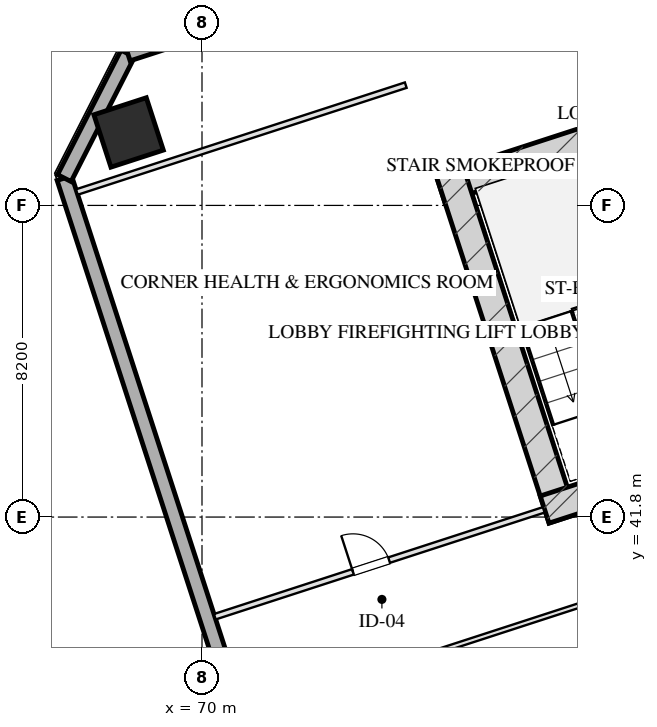
"""IFC4 building model, lengths in metres.
Left out: names, types, materials, properties, quantities, classifications, styles, units other than length and angle.
Written with IfcOpenShell. Run it as: python <this file> out.ifc"""

import sys

from ifc_helpers import new_model, si_unit, direction, frame, frame_2d, origin, origin_2d, place, context, subcontext, project, spatial, rectangle, hollow_rectangle, extrude, element, fill, save


model = new_model("IFC4")
c1 = context("Model", 3, precision=1e-05, world=origin(), true_north=direction((0.0, 1.0)))
c2 = subcontext(c1, "Body", "Model", "MODEL_VIEW")
j1 = project(units=[si_unit("LENGTHUNIT", "METRE"), si_unit("PLANEANGLEUNIT", "RADIAN")], contexts=[c1])
p1 = place(None, origin())
s1 = spatial("IfcSite", under=j1, at=p1, CompositionType="ELEMENT")
p2 = place(p1, origin())
s2 = spatial("IfcBuilding", under=s1, at=p2, CompositionType="ELEMENT")
p3 = place(p2, frame((0.0, 0.0, 85.1)))
s3 = spatial("IfcBuildingStorey", under=s2, at=p3, CompositionType="ELEMENT", Elevation=85.1)
p4 = place(p3, frame((76.272, 50.443, 0.0), z_axis=(0.0, 0.0, 1.0), x_axis=(0.951056072937, 0.309018358888, 0.0)))
e1 = element("IfcWall", 1, at=p4, inside=s3, PredefinedType="SHEAR", context=c2, shape_type="SweptSolid", body=[
    extrude(rectangle(XDim=16.55, YDim=0.75, at=frame_2d((8.275, 0.0))), origin(), (0.0, 0.0, 1.0), 3.45),
])
p5 = place(p3, frame((79.489, 41.756, 0.0), z_axis=(0.0, 0.0, 1.0), x_axis=(-0.309016134813, 0.951056795583, 0.0)))
e2 = element("IfcWall", 2, at=p5, inside=s3, PredefinedType="SHEAR", context=c2, shape_type="SweptSolid", body=[
    extrude(rectangle(XDim=9.63, YDim=0.75, at=frame_2d((4.815, 0.0))), origin(), (0.0, 0.0, 1.0), 3.45),
])
p6 = place(p3, frame((79.016, 41.997, 0.0), z_axis=(0.0, 0.0, 1.0), x_axis=(0.95106038264, 0.309005094736, 0.0)))
e3 = element("IfcWall", 3, at=p6, inside=s3, PredefinedType="SHEAR", context=c2, shape_type="SweptSolid", body=[
    extrude(rectangle(XDim=4.295, YDim=0.75, at=frame_2d((2.147, 0.0))), origin(), (0.0, 0.0, 1.0), 3.45),
])
p7 = place(p3, frame((68.069, 51.92, 0.0), z_axis=(0.0, 0.0, 1.0), x_axis=(0.951056516295, 0.309016994375, 0.0)))
e4 = element("IfcColumn", 4, at=p7, inside=s3, PredefinedType="COLUMN", context=c2, shape_type="SweptSolid", body=[
    extrude(hollow_rectangle(XDim=1.45, YDim=1.45, WallThickness=0.05, at=origin_2d()), origin(), (0.0, 0.0, 1.0), 3.451),
])
p8 = place(p3, frame((80.716, 6.59, 0.0), z_axis=(0.0, 0.0, 1.0), x_axis=(-0.309017542002, 0.95105633836, 0.0)))
e5 = element("IfcWall", 5, at=p8, inside=s3, PredefinedType="SOLIDWALL", context=c2, shape_type="SweptSolid", body=[
    extrude(rectangle(XDim=46.4, YDim=0.4, at=frame_2d((23.2, 0.0))), origin(), (0.0, 0.0, 1.0), 2.61),
])
p9 = place(p8, frame((28.4, 0.0, 0.75)))
e6 = element("IfcOpeningElement", 6, at=p9, cuts=e5, PredefinedType="OPENING", context=c2, shape_type="SweptSolid", body=[
    extrude(rectangle(XDim=2.4, YDim=1.46, at=frame_2d((1.2, 0.73))), frame((0.0, 0.21, 0.0), z_axis=(0.0, -1.0, 0.0), x_axis=(1.0, 0.0, 0.0)), (0.0, 0.0, 1.0), 0.42),
])
p10 = place(p3, frame((66.377, 50.719, 0.0), z_axis=(0.0, 0.0, 1.0), x_axis=(0.454026238093, 0.890988313685, 0.0)))
e7 = element("IfcWall", 7, at=p10, inside=s3, PredefinedType="SOLIDWALL", context=c2, shape_type="SweptSolid", body=[
    extrude(rectangle(XDim=3.677, YDim=0.4, at=frame_2d((1.838, 0.0))), origin(), (0.0, 0.0, 1.0), 2.61),
])
p11 = place(p3, frame((68.047, 53.995, 0.0), z_axis=(0.0, 0.0, 1.0), x_axis=(0.95105505922, 0.309021478754, 0.0)))
e8 = element("IfcWall", 8, at=p11, inside=s3, PredefinedType="SOLIDWALL", context=c2, shape_type="SweptSolid", body=[
    extrude(rectangle(XDim=29.4, YDim=0.4, at=frame_2d((14.7, 0.0))), origin(), (0.0, 0.0, 1.0), 2.61),
])
p12 = place(p3, frame((66.707, 50.352, 0.0), z_axis=(0.0, 0.0, 1.0), x_axis=(0.951057133767, 0.309015093986, 0.0)))
e9 = element("IfcWall", 9, at=p12, inside=s3, PredefinedType="PARTITIONING", context=c2, shape_type="SweptSolid", body=[
    extrude(rectangle(XDim=9.1, YDim=0.15, at=frame_2d((4.55, 0.0))), origin(), (0.0, 0.0, 1.0), 3.175),
])
p13 = place(p3, frame((70.338, 39.177, 0.0), z_axis=(0.0, 0.0, 1.0), x_axis=(0.951059695568, 0.309007209409, 0.0)))
e10 = element("IfcWall", 10, at=p13, inside=s3, PredefinedType="PARTITIONING", context=c2, shape_type="SweptSolid", body=[
    extrude(rectangle(XDim=9.1, YDim=0.15, at=frame_2d((4.55, 0.0))), origin(), (0.0, 0.0, 1.0), 3.175),
])
p14 = place(p13, frame((3.822, 0.0, 0.0)))
e11 = element("IfcOpeningElement", 11, at=p14, cuts=e10, PredefinedType="OPENING", context=c2, shape_type="SweptSolid", body=[
    extrude(rectangle(XDim=1.0, YDim=2.05, at=frame_2d((0.5, 1.025))), frame((0.0, 0.085, 0.0), z_axis=(0.0, -1.0, 0.0), x_axis=(1.0, 0.0, 0.0)), (0.0, 0.0, 1.0), 0.17),
])
p15 = place(p3, frame((71.166, 36.629, 0.0), z_axis=(0.0, 0.0, 1.0), x_axis=(0.951057625014, 0.309013582067, 0.0)))
e12 = element("IfcWall", 12, at=p15, inside=s3, PredefinedType="PARTITIONING", context=c2, shape_type="SweptSolid", body=[
    extrude(rectangle(XDim=18.125, YDim=0.12, at=frame_2d((9.062, 0.0))), origin(), (0.0, 0.0, 1.0), 3.175),
])
p16 = place(p3, frame((72.336, 33.028, 0.0), z_axis=(0.0, 0.0, 1.0), x_axis=(0.951058911225, 0.309009623443, 0.0)))
e13 = element("IfcWall", 13, at=p16, inside=s3, PredefinedType="PARTITIONING", context=c2, shape_type="SweptSolid", body=[
    extrude(rectangle(XDim=18.125, YDim=0.12, at=frame_2d((9.062, 0.0))), origin(), (0.0, 0.0, 1.0), 3.175),
])
p17 = place(p14, origin())
e14 = element("IfcDoor", 14, at=p17, inside=s3, OperationType="SINGLE_SWING_LEFT", PredefinedType="DOOR", context=c2, shape_type="SweptSolid", body=[
    extrude(rectangle(XDim=1.0, YDim=2.05, at=frame_2d((0.5, 1.025))), frame((0.0, 0.025, 0.0), z_axis=(0.0, -1.0, 0.0), x_axis=(1.0, 0.0, 0.0)), (0.0, 0.0, 1.0), 0.05),
])
fill(e11, e14)
save(model, sys.argv[1])
